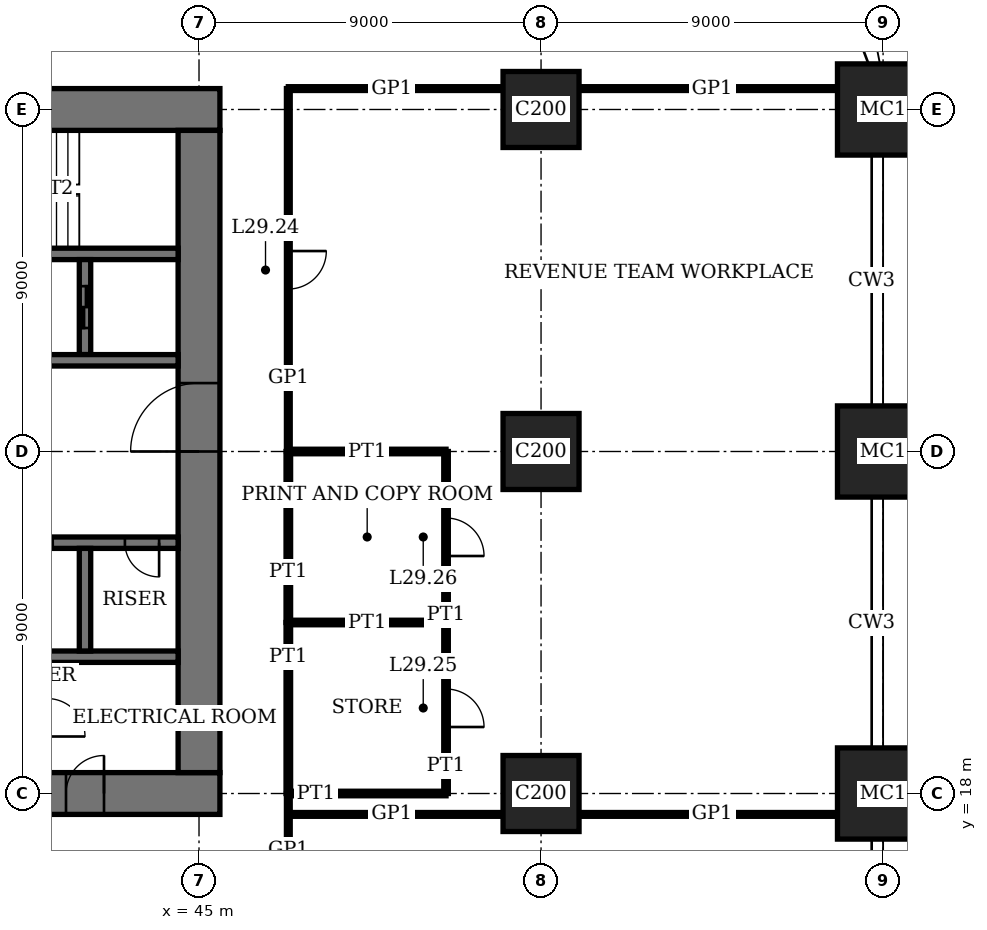
"""IFC4 building model, lengths in metres.
Left out: names, types, materials, properties, quantities, classifications, styles, units other than length and angle.
Written with IfcOpenShell. Run it as: python <this file> out.ifc"""

import sys

from ifc_helpers import new_model, si_unit, direction, frame, frame_2d, origin, origin_2d, place, context, subcontext, project, spatial, rectangle, extrude, element, fill, save


model = new_model("IFC4")
c1 = context("Model", 3, precision=1e-05, world=origin(), true_north=direction((0.0, 1.0)))
c2 = subcontext(c1, "Body", "Model", "MODEL_VIEW")
j1 = project(units=[si_unit("LENGTHUNIT", "METRE"), si_unit("PLANEANGLEUNIT", "RADIAN")], contexts=[c1])
p1 = place(None, origin())
s1 = spatial("IfcSite", under=j1, at=p1, CompositionType="ELEMENT")
p2 = place(p1, origin())
s2 = spatial("IfcBuilding", under=s1, at=p2, CompositionType="ELEMENT")
p3 = place(p2, frame((0.0, 0.0, 121.0)))
s3 = spatial("IfcBuildingStorey", under=s2, at=p3, CompositionType="ELEMENT", Elevation=121.0)
for number, where, z_axis, x_axis in (
    (1, (54.0, 18.0, 0.0), (0.0, 0.0, 1.0), (1.0, 0.0, 0.0)),
    (2, (54.0, 27.0, 0.0), (0.0, 0.0, 1.0), (1.0, 0.0, 0.0)),
    (3, (54.0, 36.0, 0.0), (0.0, 0.0, 1.0), (1.0, 0.0, 0.0)),
):
    element("IfcColumn", number, at=place(p3, frame(where, z_axis=z_axis, x_axis=x_axis)), inside=s3, PredefinedType="COLUMN", context=c2, shape_type="SweptSolid", body=[
        extrude(rectangle(XDim=2.0, YDim=2.0, at=origin_2d()), origin(), (0.0, 0.0, 1.0), 4.0),
    ])
for number, where, z_axis, x_axis in (
    (4, (63.0, 18.0, 0.0), (0.0, 0.0, 1.0), (1.0, 0.0, 0.0)),
    (5, (63.0, 27.0, 0.0), (0.0, 0.0, 1.0), (1.0, 0.0, 0.0)),
    (6, (63.0, 36.0, 0.0), (0.0, 0.0, 1.0), (1.0, 0.0, 0.0)),
):
    element("IfcColumn", number, at=place(p3, frame(where, z_axis=z_axis, x_axis=x_axis)), inside=s3, PredefinedType="COLUMN", context=c2, shape_type="SweptSolid", body=[
        extrude(rectangle(XDim=2.4, YDim=2.4, at=origin_2d()), origin(), (0.0, 0.0, 1.0), 4.0),
    ])
p4 = place(p3, frame((17.45, 18.0, 0.0), z_axis=(0.0, 0.0, 1.0), x_axis=(1.0, 0.0, 0.0)))
e7 = element("IfcWall", 7, at=p4, inside=s3, PredefinedType="SHEAR", context=c2, shape_type="SweptSolid", body=[
    extrude(rectangle(XDim=28.1, YDim=1.1, at=frame_2d((14.05, 0.0))), origin(), (0.0, 0.0, 1.0), 4.0),
])
p5 = place(p4, frame((11.55, 0.0, 0.0)))
e8 = element("IfcOpeningElement", 8, at=p5, cuts=e7, PredefinedType="OPENING", context=c2, shape_type="SweptSolid", body=[
    extrude(rectangle(XDim=1.0, YDim=2.4, at=frame_2d((0.5, 1.2))), frame((0.0, 0.56, 0.0), z_axis=(0.0, -1.0, 0.0), x_axis=(1.0, 0.0, 0.0)), (0.0, 0.0, 1.0), 1.12),
])
p6 = place(p4, frame((16.55, 0.0, 0.0)))
e9 = element("IfcOpeningElement", 9, at=p6, cuts=e7, PredefinedType="OPENING", context=c2, shape_type="SweptSolid", body=[
    extrude(rectangle(XDim=1.0, YDim=2.4, at=frame_2d((0.5, 1.2))), frame((0.0, 0.56, 0.0), z_axis=(0.0, -1.0, 0.0), x_axis=(1.0, 0.0, 0.0)), (0.0, 0.0, 1.0), 1.12),
])
p7 = place(p4, frame((20.0, 0.0, 0.0)))
e10 = element("IfcOpeningElement", 10, at=p7, cuts=e7, PredefinedType="OPENING", context=c2, shape_type="SweptSolid", body=[
    extrude(rectangle(XDim=1.1, YDim=2.4, at=frame_2d((0.55, 1.2))), frame((0.0, 0.56, 0.0), z_axis=(0.0, -1.0, 0.0), x_axis=(1.0, 0.0, 0.0)), (0.0, 0.0, 1.0), 1.12),
])
p8 = place(p4, frame((24.05, 0.0, 0.0)))
e11 = element("IfcOpeningElement", 11, at=p8, cuts=e7, PredefinedType="OPENING", context=c2, shape_type="SweptSolid", body=[
    extrude(rectangle(XDim=1.0, YDim=2.4, at=frame_2d((0.5, 1.2))), frame((0.0, 0.56, 0.0), z_axis=(0.0, -1.0, 0.0), x_axis=(1.0, 0.0, 0.0)), (0.0, 0.0, 1.0), 1.12),
])
p9 = place(p3, frame((45.55, 36.0, 0.0), z_axis=(0.0, 0.0, 1.0), x_axis=(-1.0, 0.0, 0.0)))
e12 = element("IfcWall", 12, at=p9, inside=s3, PredefinedType="SHEAR", context=c2, shape_type="SweptSolid", body=[
    extrude(rectangle(XDim=28.1, YDim=1.1, at=frame_2d((14.05, 0.0))), origin(), (0.0, 0.0, 1.0), 4.0),
])
p10 = place(p9, frame((11.55, 0.0, 0.0)))
e13 = element("IfcOpeningElement", 13, at=p10, cuts=e12, PredefinedType="OPENING", context=c2, shape_type="SweptSolid", body=[
    extrude(rectangle(XDim=1.0, YDim=2.4, at=frame_2d((0.5, 1.2))), frame((0.0, 0.56, 0.0), z_axis=(0.0, -1.0, 0.0), x_axis=(1.0, 0.0, 0.0)), (0.0, 0.0, 1.0), 1.12),
])
p11 = place(p9, frame((16.55, 0.0, 0.0)))
e14 = element("IfcOpeningElement", 14, at=p11, cuts=e12, PredefinedType="OPENING", context=c2, shape_type="SweptSolid", body=[
    extrude(rectangle(XDim=1.0, YDim=2.4, at=frame_2d((0.5, 1.2))), frame((0.0, 0.56, 0.0), z_axis=(0.0, -1.0, 0.0), x_axis=(1.0, 0.0, 0.0)), (0.0, 0.0, 1.0), 1.12),
])
p12 = place(p9, frame((20.0, 0.0, 0.0)))
e15 = element("IfcOpeningElement", 15, at=p12, cuts=e12, PredefinedType="OPENING", context=c2, shape_type="SweptSolid", body=[
    extrude(rectangle(XDim=1.1, YDim=2.4, at=frame_2d((0.55, 1.2))), frame((0.0, 0.56, 0.0), z_axis=(0.0, -1.0, 0.0), x_axis=(1.0, 0.0, 0.0)), (0.0, 0.0, 1.0), 1.12),
])
p13 = place(p9, frame((24.05, 0.0, 0.0)))
e16 = element("IfcOpeningElement", 16, at=p13, cuts=e12, PredefinedType="OPENING", context=c2, shape_type="SweptSolid", body=[
    extrude(rectangle(XDim=1.0, YDim=2.4, at=frame_2d((0.5, 1.2))), frame((0.0, 0.56, 0.0), z_axis=(0.0, -1.0, 0.0), x_axis=(1.0, 0.0, 0.0)), (0.0, 0.0, 1.0), 1.12),
])
p14 = place(p3, frame((45.0, 18.55, 0.0), z_axis=(0.0, 0.0, 1.0), x_axis=(0.0, 1.0, 0.0)))
e17 = element("IfcWall", 17, at=p14, inside=s3, PredefinedType="SHEAR", context=c2, shape_type="SweptSolid", body=[
    extrude(rectangle(XDim=16.9, YDim=1.1, at=frame_2d((8.45, 0.0))), origin(), (0.0, 0.0, 1.0), 4.0),
])
p15 = place(p14, frame((8.45, 0.0, 0.0)))
e18 = element("IfcOpeningElement", 18, at=p15, cuts=e17, PredefinedType="OPENING", context=c2, shape_type="SweptSolid", body=[
    extrude(rectangle(XDim=1.8, YDim=2.4, at=frame_2d((0.9, 1.2))), frame((0.0, 0.56, 0.0), z_axis=(0.0, -1.0, 0.0), x_axis=(1.0, 0.0, 0.0)), (0.0, 0.0, 1.0), 1.12),
])
p16 = place(p3, frame((36.15, 32.2, 0.0), z_axis=(0.0, 0.0, 1.0), x_axis=(1.0, 0.0, 0.0)))
e19 = element("IfcWall", 19, at=p16, inside=s3, PredefinedType="SHEAR", context=c2, shape_type="SweptSolid", body=[
    extrude(rectangle(XDim=8.3, YDim=0.3, at=frame_2d((4.15, 0.0))), origin(), (0.0, 0.0, 1.0), 4.0),
])
p17 = place(p16, frame((0.45, 0.0, 0.0)))
e20 = element("IfcOpeningElement", 20, at=p17, cuts=e19, PredefinedType="OPENING", context=c2, shape_type="SweptSolid", body=[
    extrude(rectangle(XDim=1.0, YDim=2.4, at=frame_2d((0.5, 1.2))), frame((0.0, 0.16, 0.0), z_axis=(0.0, -1.0, 0.0), x_axis=(1.0, 0.0, 0.0)), (0.0, 0.0, 1.0), 0.32),
])
p18 = place(p3, frame((42.0, 29.55, 0.0), z_axis=(0.0, 0.0, 1.0), x_axis=(0.0, 1.0, 0.0)))
e21 = element("IfcWall", 21, at=p18, inside=s3, PredefinedType="SHEAR", context=c2, shape_type="SweptSolid", body=[
    extrude(rectangle(XDim=2.5, YDim=0.3, at=frame_2d((1.25, 0.0))), origin(), (0.0, 0.0, 1.0), 4.0),
])
p19 = place(p18, frame((0.7, 0.0, 0.0)))
e22 = element("IfcOpeningElement", 22, at=p19, cuts=e21, PredefinedType="OPENING", context=c2, shape_type="SweptSolid", body=[
    extrude(rectangle(XDim=1.1, YDim=2.4, at=frame_2d((0.55, 1.2))), frame((0.0, 0.16, 0.0), z_axis=(0.0, -1.0, 0.0), x_axis=(1.0, 0.0, 0.0)), (0.0, 0.0, 1.0), 0.32),
])
p20 = place(p3, frame((18.55, 24.6, 0.0), z_axis=(0.0, 0.0, 1.0), x_axis=(1.0, 0.0, 0.0)))
e23 = element("IfcWall", 23, at=p20, inside=s3, PredefinedType="SHEAR", context=c2, shape_type="SweptSolid", body=[
    extrude(rectangle(XDim=25.9, YDim=0.3, at=frame_2d((12.95, 0.0))), origin(), (0.0, 0.0, 1.0), 4.0),
])
p21 = place(p20, frame((4.95, 0.0, 0.0)))
e24 = element("IfcOpeningElement", 24, at=p21, cuts=e23, PredefinedType="OPENING", context=c2, shape_type="SweptSolid", body=[
    extrude(rectangle(XDim=1.0, YDim=2.4, at=frame_2d((0.5, 1.2))), frame((0.0, 0.16, 0.0), z_axis=(0.0, -1.0, 0.0), x_axis=(1.0, 0.0, 0.0)), (0.0, 0.0, 1.0), 0.32),
])
p22 = place(p20, frame((24.5, 0.0, 0.0)))
e25 = element("IfcOpeningElement", 25, at=p22, cuts=e23, PredefinedType="OPENING", context=c2, shape_type="SweptSolid", body=[
    extrude(rectangle(XDim=0.9, YDim=2.1, at=frame_2d((0.45, 1.05))), frame((0.0, 0.16, 0.0), z_axis=(0.0, -1.0, 0.0), x_axis=(1.0, 0.0, 0.0)), (0.0, 0.0, 1.0), 0.32),
])
p23 = place(p20, frame((21.3, 0.0, 0.0)))
e26 = element("IfcOpeningElement", 26, at=p23, cuts=e23, PredefinedType="OPENING", context=c2, shape_type="SweptSolid", body=[
    extrude(rectangle(XDim=1.3, YDim=2.4, at=frame_2d((0.65, 1.2))), frame((0.0, 0.16, 0.0), z_axis=(0.0, -1.0, 0.0), x_axis=(1.0, 0.0, 0.0)), (0.0, 0.0, 1.0), 0.32),
])
p24 = place(p3, frame((18.55, 29.4, 0.0), z_axis=(0.0, 0.0, 1.0), x_axis=(1.0, 0.0, 0.0)))
e27 = element("IfcWall", 27, at=p24, inside=s3, PredefinedType="SHEAR", context=c2, shape_type="SweptSolid", body=[
    extrude(rectangle(XDim=25.9, YDim=0.3, at=frame_2d((12.95, 0.0))), origin(), (0.0, 0.0, 1.0), 4.0),
])
p25 = place(p24, frame((19.95, 0.0, 0.0)))
e28 = element("IfcOpeningElement", 28, at=p25, cuts=e27, PredefinedType="OPENING", context=c2, shape_type="SweptSolid", body=[
    extrude(rectangle(XDim=1.0, YDim=2.4, at=frame_2d((0.5, 1.2))), frame((0.0, 0.16, 0.0), z_axis=(0.0, -1.0, 0.0), x_axis=(1.0, 0.0, 0.0)), (0.0, 0.0, 1.0), 0.32),
])
p26 = place(p24, frame((0.5, 0.0, 0.0)))
e29 = element("IfcOpeningElement", 29, at=p26, cuts=e27, PredefinedType="OPENING", context=c2, shape_type="SweptSolid", body=[
    extrude(rectangle(XDim=0.9, YDim=2.1, at=frame_2d((0.45, 1.05))), frame((0.0, 0.16, 0.0), z_axis=(0.0, -1.0, 0.0), x_axis=(1.0, 0.0, 0.0)), (0.0, 0.0, 1.0), 0.32),
])
p27 = place(p24, frame((15.4, 0.0, 0.0)))
e30 = element("IfcOpeningElement", 30, at=p27, cuts=e27, PredefinedType="OPENING", context=c2, shape_type="SweptSolid", body=[
    extrude(rectangle(XDim=1.1, YDim=2.4, at=frame_2d((0.55, 1.2))), frame((0.0, 0.16, 0.0), z_axis=(0.0, -1.0, 0.0), x_axis=(1.0, 0.0, 0.0)), (0.0, 0.0, 1.0), 0.32),
])
p28 = place(p24, frame((12.4, 0.0, 0.0)))
e31 = element("IfcOpeningElement", 31, at=p28, cuts=e27, PredefinedType="OPENING", context=c2, shape_type="SweptSolid", body=[
    extrude(rectangle(XDim=1.1, YDim=2.4, at=frame_2d((0.55, 1.2))), frame((0.0, 0.16, 0.0), z_axis=(0.0, -1.0, 0.0), x_axis=(1.0, 0.0, 0.0)), (0.0, 0.0, 1.0), 0.32),
])
p29 = place(p24, frame((3.3, 0.0, 0.0)))
e32 = element("IfcOpeningElement", 32, at=p29, cuts=e27, PredefinedType="OPENING", context=c2, shape_type="SweptSolid", body=[
    extrude(rectangle(XDim=1.3, YDim=2.4, at=frame_2d((0.65, 1.2))), frame((0.0, 0.16, 0.0), z_axis=(0.0, -1.0, 0.0), x_axis=(1.0, 0.0, 0.0)), (0.0, 0.0, 1.0), 0.32),
])
p30 = place(p3, frame((27.15, 21.6, 0.0), z_axis=(0.0, 0.0, 1.0), x_axis=(1.0, 0.0, 0.0)))
e33 = element("IfcWall", 33, at=p30, inside=s3, PredefinedType="SHEAR", context=c2, shape_type="SweptSolid", body=[
    extrude(rectangle(XDim=17.3, YDim=0.3, at=frame_2d((8.65, 0.0))), origin(), (0.0, 0.0, 1.0), 4.0),
])
p31 = place(p3, frame((42.0, 21.75, 0.0), z_axis=(0.0, 0.0, 1.0), x_axis=(0.0, 1.0, 0.0)))
e34 = element("IfcWall", 34, at=p31, inside=s3, PredefinedType="SHEAR", context=c2, shape_type="SweptSolid", body=[
    extrude(rectangle(XDim=2.7, YDim=0.3, at=frame_2d((1.35, 0.0))), origin(), (0.0, 0.0, 1.0), 4.0),
])
p32 = place(p3, frame((47.35, 17.45, 0.0), z_axis=(0.0, 0.0, 1.0), x_axis=(1.0, 0.0, 0.0)))
e35 = element("IfcWall", 35, at=p32, inside=s3, PredefinedType="PARTITIONING", context=c2, shape_type="SweptSolid", body=[
    extrude(rectangle(XDim=5.65, YDim=0.1, at=frame_2d((2.825, 0.0))), origin(), (0.0, 0.0, 1.0), 3.75),
])
p33 = place(p3, frame((55.0, 17.45, 0.0), z_axis=(0.0, 0.0, 1.0), x_axis=(1.0, 0.0, 0.0)))
e36 = element("IfcWall", 36, at=p33, inside=s3, PredefinedType="PARTITIONING", context=c2, shape_type="SweptSolid", body=[
    extrude(rectangle(XDim=6.8, YDim=0.1, at=frame_2d((3.4, 0.0))), origin(), (0.0, 0.0, 1.0), 3.75),
])
p34 = place(p3, frame((47.35, 18.0, 0.0), z_axis=(0.0, 0.0, 1.0), x_axis=(1.0, 0.0, 0.0)))
e37 = element("IfcWall", 37, at=p34, inside=s3, PredefinedType="PARTITIONING", context=c2, shape_type="SweptSolid", body=[
    extrude(rectangle(XDim=4.15, YDim=0.12, at=frame_2d((2.075, 0.0))), origin(), (0.0, 0.0, 1.0), 3.05),
])
p35 = place(p3, frame((47.35, 22.5, 0.0), z_axis=(0.0, 0.0, 1.0), x_axis=(1.0, 0.0, 0.0)))
e38 = element("IfcWall", 38, at=p35, inside=s3, PredefinedType="PARTITIONING", context=c2, shape_type="SweptSolid", body=[
    extrude(rectangle(XDim=4.15, YDim=0.12, at=frame_2d((2.075, 0.0))), origin(), (0.0, 0.0, 1.0), 3.1),
])
p36 = place(p3, frame((47.35, 27.0, 0.0), z_axis=(0.0, 0.0, 1.0), x_axis=(1.0, 0.0, 0.0)))
e39 = element("IfcWall", 39, at=p36, inside=s3, PredefinedType="PARTITIONING", context=c2, shape_type="SweptSolid", body=[
    extrude(rectangle(XDim=4.15, YDim=0.12, at=frame_2d((2.075, 0.0))), origin(), (0.0, 0.0, 1.0), 3.05),
])
p37 = place(p3, frame((47.35, 36.55, 0.0), z_axis=(0.0, 0.0, 1.0), x_axis=(1.0, 0.0, 0.0)))
e40 = element("IfcWall", 40, at=p37, inside=s3, PredefinedType="PARTITIONING", context=c2, shape_type="SweptSolid", body=[
    extrude(rectangle(XDim=5.65, YDim=0.1, at=frame_2d((2.825, 0.0))), origin(), (0.0, 0.0, 1.0), 3.75),
])
p38 = place(p3, frame((55.0, 36.55, 0.0), z_axis=(0.0, 0.0, 1.0), x_axis=(1.0, 0.0, 0.0)))
e41 = element("IfcWall", 41, at=p38, inside=s3, PredefinedType="PARTITIONING", context=c2, shape_type="SweptSolid", body=[
    extrude(rectangle(XDim=6.8, YDim=0.1, at=frame_2d((3.4, 0.0))), origin(), (0.0, 0.0, 1.0), 3.75),
])
for number, where, z_axis, x_axis in (
    (42, (47.35, 18.0, 0.0), (0.0, 0.0, 1.0), (0.0, 1.0, 0.0)),
    (43, (47.35, 22.5, 0.0), (0.0, 0.0, 1.0), (0.0, 1.0, 0.0)),
):
    element("IfcWall", number, at=place(p3, frame(where, z_axis=z_axis, x_axis=x_axis)), inside=s3, PredefinedType="PARTITIONING", context=c2, shape_type="SweptSolid", body=[
        extrude(rectangle(XDim=4.5, YDim=0.12, at=frame_2d((2.25, 0.0))), origin(), (0.0, 0.0, 1.0), 3.75),
    ])
p39 = place(p3, frame((47.35, 15.65, 0.0), z_axis=(0.0, 0.0, 1.0), x_axis=(0.0, 1.0, 0.0)))
e44 = element("IfcWall", 44, at=p39, inside=s3, PredefinedType="PARTITIONING", context=c2, shape_type="SweptSolid", body=[
    extrude(rectangle(XDim=2.35, YDim=0.1, at=frame_2d((1.175, 0.0))), origin(), (0.0, 0.0, 1.0), 3.75),
])
p40 = place(p3, frame((47.35, 27.0, 0.0), z_axis=(0.0, 0.0, 1.0), x_axis=(0.0, 1.0, 0.0)))
e45 = element("IfcWall", 45, at=p40, inside=s3, PredefinedType="PARTITIONING", context=c2, shape_type="SweptSolid", body=[
    extrude(rectangle(XDim=9.55, YDim=0.1, at=frame_2d((4.775, 0.0))), origin(), (0.0, 0.0, 1.0), 3.75),
])
p41 = place(p40, frame((4.275, 0.0, 0.0)))
e46 = element("IfcOpeningElement", 46, at=p41, cuts=e45, PredefinedType="OPENING", context=c2, shape_type="SweptSolid", body=[
    extrude(rectangle(XDim=1.0, YDim=2.4, at=frame_2d((0.5, 1.2))), frame((0.0, 0.06, 0.0), z_axis=(0.0, -1.0, 0.0), x_axis=(1.0, 0.0, 0.0)), (0.0, 0.0, 1.0), 0.12),
])
p42 = place(p3, frame((51.5, 18.0, 0.0), z_axis=(0.0, 0.0, 1.0), x_axis=(0.0, 1.0, 0.0)))
e47 = element("IfcWall", 47, at=p42, inside=s3, PredefinedType="PARTITIONING", context=c2, shape_type="SweptSolid", body=[
    extrude(rectangle(XDim=4.5, YDim=0.12, at=frame_2d((2.25, 0.0))), origin(), (0.0, 0.0, 1.0), 3.75),
])
p43 = place(p42, frame((1.75, 0.0, 0.0)))
e48 = element("IfcOpeningElement", 48, at=p43, cuts=e47, PredefinedType="OPENING", context=c2, shape_type="SweptSolid", body=[
    extrude(rectangle(XDim=1.0, YDim=2.4, at=frame_2d((0.5, 1.2))), frame((0.0, 0.07, 0.0), z_axis=(0.0, -1.0, 0.0), x_axis=(1.0, 0.0, 0.0)), (0.0, 0.0, 1.0), 0.14),
])
p44 = place(p3, frame((51.5, 22.5, 0.0), z_axis=(0.0, 0.0, 1.0), x_axis=(0.0, 1.0, 0.0)))
e49 = element("IfcWall", 49, at=p44, inside=s3, PredefinedType="PARTITIONING", context=c2, shape_type="SweptSolid", body=[
    extrude(rectangle(XDim=4.5, YDim=0.12, at=frame_2d((2.25, 0.0))), origin(), (0.0, 0.0, 1.0), 3.75),
])
p45 = place(p44, frame((1.75, 0.0, 0.0)))
e50 = element("IfcOpeningElement", 50, at=p45, cuts=e49, PredefinedType="OPENING", context=c2, shape_type="SweptSolid", body=[
    extrude(rectangle(XDim=1.0, YDim=2.4, at=frame_2d((0.5, 1.2))), frame((0.0, 0.07, 0.0), z_axis=(0.0, -1.0, 0.0), x_axis=(1.0, 0.0, 0.0)), (0.0, 0.0, 1.0), 0.14),
])
p46 = place(p15, origin())
e51 = element("IfcDoor", 51, at=p46, inside=s3, OperationType="DOUBLE_DOOR_DOUBLE_SWING", PredefinedType="DOOR", context=c2, shape_type="SweptSolid", body=[
    extrude(rectangle(XDim=1.8, YDim=2.4, at=frame_2d((0.9, 1.2))), frame((0.0, 0.03, 0.0), z_axis=(0.0, -1.0, 0.0), x_axis=(1.0, 0.0, 0.0)), (0.0, 0.0, 1.0), 0.06),
    extrude(rectangle(XDim=0.04, YDim=2.4, at=frame_2d((0.02, 1.2))), frame((0.0, 0.55, 0.0), z_axis=(0.0, -1.0, 0.0), x_axis=(1.0, 0.0, 0.0)), (0.0, 0.0, 1.0), 1.1),
    extrude(rectangle(XDim=0.04, YDim=2.4, at=frame_2d((1.78, 1.2))), frame((0.0, 0.55, 0.0), z_axis=(0.0, -1.0, 0.0), x_axis=(1.0, 0.0, 0.0)), (0.0, 0.0, 1.0), 1.1),
    extrude(rectangle(XDim=1.8, YDim=0.04, at=frame_2d((0.9, 2.38))), frame((0.0, 0.55, 0.0), z_axis=(0.0, -1.0, 0.0), x_axis=(1.0, 0.0, 0.0)), (0.0, 0.0, 1.0), 1.1),
])
fill(e18, e51)
p47 = place(p8, origin())
e52 = element("IfcDoor", 52, at=p47, inside=s3, OperationType="SINGLE_SWING_LEFT", PredefinedType="DOOR", context=c2, shape_type="SweptSolid", body=[
    extrude(rectangle(XDim=1.0, YDim=2.4, at=frame_2d((0.5, 1.2))), frame((0.0, 0.025, 0.0), z_axis=(0.0, -1.0, 0.0), x_axis=(1.0, 0.0, 0.0)), (0.0, 0.0, 1.0), 0.05),
    extrude(rectangle(XDim=0.04, YDim=2.4, at=frame_2d((0.02, 1.2))), frame((0.0, 0.4, 0.0), z_axis=(0.0, -1.0, 0.0), x_axis=(1.0, 0.0, 0.0)), (0.0, 0.0, 1.0), 0.8),
    extrude(rectangle(XDim=0.04, YDim=2.4, at=frame_2d((0.98, 1.2))), frame((0.0, 0.4, 0.0), z_axis=(0.0, -1.0, 0.0), x_axis=(1.0, 0.0, 0.0)), (0.0, 0.0, 1.0), 0.8),
    extrude(rectangle(XDim=1.0, YDim=0.04, at=frame_2d((0.5, 2.38))), frame((0.0, 0.4, 0.0), z_axis=(0.0, -1.0, 0.0), x_axis=(1.0, 0.0, 0.0)), (0.0, 0.0, 1.0), 0.8),
])
fill(e11, e52)
p48 = place(p22, origin())
e53 = element("IfcDoor", 53, at=p48, inside=s3, OperationType="SINGLE_SWING_RIGHT", PredefinedType="DOOR", context=c2, shape_type="SweptSolid", body=[
    extrude(rectangle(XDim=0.9, YDim=2.1, at=frame_2d((0.45, 1.05))), frame((0.0, 0.03, 0.0), z_axis=(0.0, -1.0, 0.0), x_axis=(1.0, 0.0, 0.0)), (0.0, 0.0, 1.0), 0.06),
])
fill(e25, e53)
p49 = place(p41, origin())
e54 = element("IfcDoor", 54, at=p49, inside=s3, OperationType="SINGLE_SWING_RIGHT", PredefinedType="DOOR", context=c2, shape_type="SweptSolid", body=[
    extrude(rectangle(XDim=1.0, YDim=2.4, at=frame_2d((0.5, 1.2))), frame((0.0, 0.02, 0.0), z_axis=(0.0, -1.0, 0.0), x_axis=(1.0, 0.0, 0.0)), (0.0, 0.0, 1.0), 0.04),
])
fill(e46, e54)
p50 = place(p43, origin())
e55 = element("IfcDoor", 55, at=p50, inside=s3, OperationType="SINGLE_SWING_LEFT", PredefinedType="DOOR", context=c2, shape_type="SweptSolid", body=[
    extrude(rectangle(XDim=1.0, YDim=2.4, at=frame_2d((0.5, 1.2))), frame((0.0, 0.025, 0.0), z_axis=(0.0, -1.0, 0.0), x_axis=(1.0, 0.0, 0.0)), (0.0, 0.0, 1.0), 0.05),
])
fill(e48, e55)
p51 = place(p45, origin())
e56 = element("IfcDoor", 56, at=p51, inside=s3, OperationType="SINGLE_SWING_LEFT", PredefinedType="DOOR", context=c2, shape_type="SweptSolid", body=[
    extrude(rectangle(XDim=1.0, YDim=2.4, at=frame_2d((0.5, 1.2))), frame((0.0, 0.025, 0.0), z_axis=(0.0, -1.0, 0.0), x_axis=(1.0, 0.0, 0.0)), (0.0, 0.0, 1.0), 0.05),
])
fill(e50, e56)
p52 = place(p23, origin())
e57 = element("IfcDoor", 57, at=p52, inside=s3, OperationType="DOUBLE_DOOR_SLIDING", PredefinedType="DOOR", context=c2, shape_type="SweptSolid", body=[
    extrude(rectangle(XDim=1.3, YDim=2.4, at=frame_2d((0.65, 1.2))), frame((0.0, 0.02, 0.0), z_axis=(0.0, -1.0, 0.0), x_axis=(1.0, 0.0, 0.0)), (0.0, 0.0, 1.0), 0.04),
])
fill(e26, e57)
p53 = place(p19, origin())
e58 = element("IfcDoor", 58, at=p53, inside=s3, OperationType="DOUBLE_DOOR_SLIDING", PredefinedType="DOOR", context=c2, shape_type="SweptSolid", body=[
    extrude(rectangle(XDim=1.1, YDim=2.4, at=frame_2d((0.55, 1.2))), frame((0.0, 0.03, 0.0), z_axis=(0.0, -1.0, 0.0), x_axis=(1.0, 0.0, 0.0)), (0.0, 0.0, 1.0), 0.06),
])
fill(e22, e58)
save(model, sys.argv[1])
